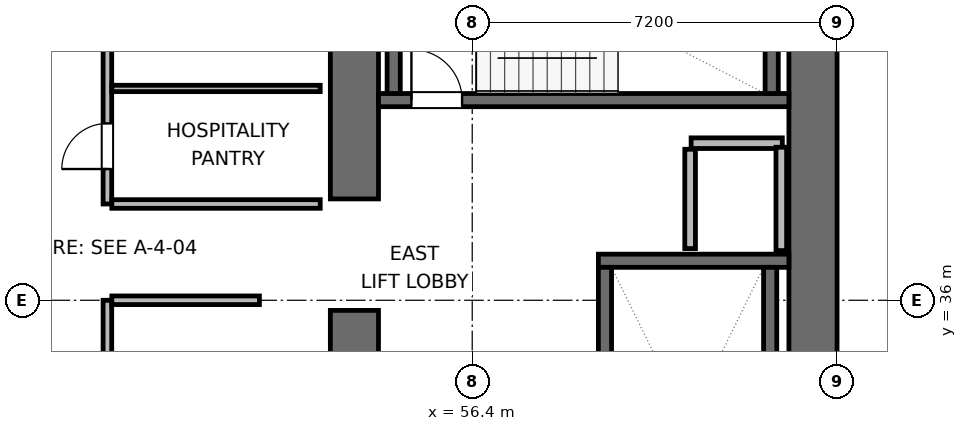
"""IFC4 building model, lengths in metres.
Left out: names, types, materials, properties, quantities, classifications, styles, units other than length and angle.
Written with IfcOpenShell. Run it as: python <this file> out.ifc"""

import sys

from ifc_helpers import new_model, si_unit, direction, frame, frame_2d, origin, place, context, subcontext, project, spatial, rectangle, extrude, element, fill, save


model = new_model("IFC4")
c1 = context("Model", 3, precision=1e-05, world=origin(), true_north=direction((0.0, 1.0)))
c2 = subcontext(c1, "Body", "Model", "MODEL_VIEW")
j1 = project(units=[si_unit("LENGTHUNIT", "METRE"), si_unit("PLANEANGLEUNIT", "RADIAN")], contexts=[c1])
p1 = place(None, origin())
s1 = spatial("IfcSite", under=j1, at=p1, CompositionType="ELEMENT")
p2 = place(p1, origin())
s2 = spatial("IfcBuilding", under=s1, at=p2, CompositionType="ELEMENT")
p3 = place(p2, frame((0.0, 0.0, 33.3)))
s3 = spatial("IfcBuildingStorey", under=s2, at=p3, CompositionType="ELEMENT", Elevation=33.3)
p4 = place(p3, frame((54.075, 28.075, 0.0), z_axis=(0.0, 0.0, 1.0), x_axis=(0.0, 1.0, 0.0)))
e1 = element("IfcWall", 1, at=p4, inside=s3, PredefinedType="SHEAR", context=c2, shape_type="SweptSolid", body=[
    extrude(rectangle(XDim=7.725, YDim=0.95, at=frame_2d((3.863, 0.0))), origin(), (0.0, 0.0, 1.0), 3.9),
])
p5 = place(p3, frame((54.075, 38.0, 0.0), z_axis=(0.0, 0.0, 1.0), x_axis=(0.0, 1.0, 0.0)))
e2 = element("IfcWall", 2, at=p5, inside=s3, PredefinedType="SHEAR", context=c2, shape_type="SweptSolid", body=[
    extrude(rectangle(XDim=5.925, YDim=0.95, at=frame_2d((2.962, 0.0))), origin(), (0.0, 0.0, 1.0), 3.9),
])
p6 = place(p3, frame((63.125, 27.6, 0.0), z_axis=(0.0, 0.0, 1.0), x_axis=(0.0, 1.0, 0.0)))
e3 = element("IfcWall", 3, at=p6, inside=s3, PredefinedType="SHEAR", context=c2, shape_type="SweptSolid", body=[
    extrude(rectangle(XDim=16.8, YDim=0.95, at=frame_2d((8.4, 0.0))), origin(), (0.0, 0.0, 1.0), 3.9),
])
p7 = place(p3, frame((58.89, 36.78, 0.0), z_axis=(0.0, 0.0, 1.0), x_axis=(1.0, 0.0, 0.0)))
e4 = element("IfcWall", 4, at=p7, inside=s3, PredefinedType="SHEAR", context=c2, shape_type="SweptSolid", body=[
    extrude(rectangle(XDim=3.76, YDim=0.26, at=frame_2d((1.88, 0.0))), origin(), (0.0, 0.0, 1.0), 3.9),
])
p8 = place(p3, frame((59.02, 29.05, 0.0), z_axis=(0.0, 0.0, 1.0), x_axis=(0.0, 1.0, 0.0)))
e5 = element("IfcWall", 5, at=p8, inside=s3, PredefinedType="SHEAR", context=c2, shape_type="SweptSolid", body=[
    extrude(rectangle(XDim=7.6, YDim=0.26, at=frame_2d((3.8, 0.0))), origin(), (0.0, 0.0, 1.0), 3.9),
])
p9 = place(p8, frame((0.3, 0.0, 0.0)))
e6 = element("IfcOpeningElement", 6, at=p9, cuts=e5, PredefinedType="OPENING", context=c2, shape_type="SweptSolid", body=[
    extrude(rectangle(XDim=1.0, YDim=2.04, at=frame_2d((0.5, 1.02))), frame((0.0, 0.14, 0.0), z_axis=(0.0, -1.0, 0.0), x_axis=(1.0, 0.0, 0.0)), (0.0, 0.0, 1.0), 0.28),
])
p10 = place(p3, frame((62.28, 29.05, 0.0), z_axis=(0.0, 0.0, 1.0), x_axis=(0.0, 1.0, 0.0)))
e7 = element("IfcWall", 7, at=p10, inside=s3, PredefinedType="SHEAR", context=c2, shape_type="SweptSolid", body=[
    extrude(rectangle(XDim=7.6, YDim=0.26, at=frame_2d((3.8, 0.0))), origin(), (0.0, 0.0, 1.0), 3.9),
])
p11 = place(p3, frame((54.55, 39.95, 0.0), z_axis=(0.0, 0.0, 1.0), x_axis=(1.0, 0.0, 0.0)))
e8 = element("IfcWall", 8, at=p11, inside=s3, PredefinedType="SHEAR", context=c2, shape_type="SweptSolid", body=[
    extrude(rectangle(XDim=8.1, YDim=0.26, at=frame_2d((4.05, 0.0))), origin(), (0.0, 0.0, 1.0), 3.9),
])
p12 = place(p11, frame((0.65, 0.0, 0.0)))
e9 = element("IfcOpeningElement", 9, at=p12, cuts=e8, PredefinedType="OPENING", context=c2, shape_type="SweptSolid", body=[
    extrude(rectangle(XDim=1.0, YDim=2.04, at=frame_2d((0.5, 1.02))), frame((0.0, 0.14, 0.0), z_axis=(0.0, -1.0, 0.0), x_axis=(1.0, 0.0, 0.0)), (0.0, 0.0, 1.0), 0.28),
])
for number, where, z_axis, x_axis in (
    (10, (54.85, 40.08, 0.0), (0.0, 0.0, 1.0), (0.0, 1.0, 0.0)),
    (11, (62.31, 40.08, 0.0), (0.0, 0.0, 1.0), (0.0, 1.0, 0.0)),
):
    element("IfcWall", number, at=place(p3, frame(where, z_axis=z_axis, x_axis=x_axis)), inside=s3, PredefinedType="SHEAR", context=c2, shape_type="SweptSolid", body=[
        extrude(rectangle(XDim=2.94, YDim=0.26, at=frame_2d((1.47, 0.0))), origin(), (0.0, 0.0, 1.0), 3.9),
    ])
p13 = place(p3, frame((60.72, 39.1, 0.0), z_axis=(0.0, 0.0, 1.0), x_axis=(1.0, 0.0, 0.0)))
e12 = element("IfcWall", 12, at=p13, inside=s3, PredefinedType="PARTITIONING", context=c2, shape_type="SweptSolid", body=[
    extrude(rectangle(XDim=1.8, YDim=0.21, at=frame_2d((0.9, 0.0))), origin(), (0.0, 0.0, 1.0), 3.64),
])
p14 = place(p3, frame((60.7, 37.02, 0.0), z_axis=(0.0, 0.0, 1.0), x_axis=(0.0, 1.0, 0.0)))
e13 = element("IfcWall", 13, at=p14, inside=s3, PredefinedType="PARTITIONING", context=c2, shape_type="SweptSolid", body=[
    extrude(rectangle(XDim=1.96, YDim=0.21, at=frame_2d((0.98, 0.0))), origin(), (0.0, 0.0, 1.0), 3.64),
])
p15 = place(p3, frame((62.5, 36.98, 0.0), z_axis=(0.0, 0.0, 1.0), x_axis=(0.0, 1.0, 0.0)))
e14 = element("IfcWall", 14, at=p15, inside=s3, PredefinedType="PARTITIONING", context=c2, shape_type="SweptSolid", body=[
    extrude(rectangle(XDim=2.04, YDim=0.21, at=frame_2d((1.02, 0.0))), origin(), (0.0, 0.0, 1.0), 3.64),
])
p16 = place(p3, frame((49.2, 32.6, 0.0), z_axis=(0.0, 0.0, 1.0), x_axis=(0.0, 1.0, 0.0)))
e15 = element("IfcWall", 15, at=p16, inside=s3, PredefinedType="PARTITIONING", context=c2, shape_type="SweptSolid", body=[
    extrude(rectangle(XDim=3.4, YDim=0.17, at=frame_2d((1.7, 0.0))), origin(), (0.0, 0.0, 1.0), 3.64),
])
p17 = place(p16, frame((0.638, 0.0, 0.0)))
e16 = element("IfcOpeningElement", 16, at=p17, cuts=e15, PredefinedType="OPENING", context=c2, shape_type="SweptSolid", body=[
    extrude(rectangle(XDim=0.9, YDim=2.02, at=frame_2d((0.45, 1.01))), frame((0.0, 0.095, 0.0), z_axis=(0.0, -1.0, 0.0), x_axis=(1.0, 0.0, 0.0)), (0.0, 0.0, 1.0), 0.19),
])
p18 = place(p3, frame((49.287, 36.0, 0.0), z_axis=(0.0, 0.0, 1.0), x_axis=(1.0, 0.0, 0.0)))
e17 = element("IfcWall", 17, at=p18, inside=s3, PredefinedType="PARTITIONING", context=c2, shape_type="SweptSolid", body=[
    extrude(rectangle(XDim=2.913, YDim=0.17, at=frame_2d((1.457, 0.0))), origin(), (0.0, 0.0, 1.0), 3.64),
])
p19 = place(p3, frame((49.2, 37.9, 0.0), z_axis=(0.0, 0.0, 1.0), x_axis=(0.0, 1.0, 0.0)))
e18 = element("IfcWall", 18, at=p19, inside=s3, PredefinedType="PARTITIONING", context=c2, shape_type="SweptSolid", body=[
    extrude(rectangle(XDim=6.0, YDim=0.17, at=frame_2d((3.0, 0.0))), origin(), (0.0, 0.0, 1.0), 3.64),
])
p20 = place(p19, frame((0.69, 0.0, 0.0)))
e19 = element("IfcOpeningElement", 19, at=p20, cuts=e18, PredefinedType="OPENING", context=c2, shape_type="SweptSolid", body=[
    extrude(rectangle(XDim=0.9, YDim=2.02, at=frame_2d((0.45, 1.01))), frame((0.0, 0.095, 0.0), z_axis=(0.0, -1.0, 0.0), x_axis=(1.0, 0.0, 0.0)), (0.0, 0.0, 1.0), 0.19),
])
p21 = place(p19, frame((3.69, 0.0, 0.0)))
e20 = element("IfcOpeningElement", 20, at=p21, cuts=e18, PredefinedType="OPENING", context=c2, shape_type="SweptSolid", body=[
    extrude(rectangle(XDim=0.9, YDim=2.02, at=frame_2d((0.45, 1.01))), frame((0.0, 0.095, 0.0), z_axis=(0.0, -1.0, 0.0), x_axis=(1.0, 0.0, 0.0)), (0.0, 0.0, 1.0), 0.19),
])
p22 = place(p3, frame((49.287, 37.9, 0.0), z_axis=(0.0, 0.0, 1.0), x_axis=(1.0, 0.0, 0.0)))
e21 = element("IfcWall", 21, at=p22, inside=s3, PredefinedType="PARTITIONING", context=c2, shape_type="SweptSolid", body=[
    extrude(rectangle(XDim=4.113, YDim=0.17, at=frame_2d((2.056, 0.0))), origin(), (0.0, 0.0, 1.0), 3.64),
])
p23 = place(p3, frame((49.287, 40.18, 0.0), z_axis=(0.0, 0.0, 1.0), x_axis=(1.0, 0.0, 0.0)))
e22 = element("IfcWall", 22, at=p23, inside=s3, PredefinedType="PARTITIONING", context=c2, shape_type="SweptSolid", body=[
    extrude(rectangle(XDim=4.113, YDim=0.125, at=frame_2d((2.056, 0.0))), origin(), (0.0, 0.0, 1.0), 3.64),
])
p24 = place(p12, origin())
e23 = element("IfcDoor", 23, at=p24, inside=s3, OperationType="SINGLE_SWING_LEFT", PredefinedType="DOOR", context=c2, shape_type="SweptSolid", body=[
    extrude(rectangle(XDim=1.0, YDim=2.04, at=frame_2d((0.5, 1.02))), frame((0.0, 0.025, 0.0), z_axis=(0.0, -1.0, 0.0), x_axis=(1.0, 0.0, 0.0)), (0.0, 0.0, 1.0), 0.05),
])
fill(e9, e23)
p25 = place(p20, origin())
e24 = element("IfcDoor", 24, at=p25, inside=s3, OperationType="SINGLE_SWING_LEFT", PredefinedType="DOOR", context=c2, shape_type="SweptSolid", body=[
    extrude(rectangle(XDim=0.9, YDim=2.02, at=frame_2d((0.45, 1.01))), frame((0.0, 0.025, 0.0), z_axis=(0.0, -1.0, 0.0), x_axis=(1.0, 0.0, 0.0)), (0.0, 0.0, 1.0), 0.05),
])
fill(e19, e24)
save(model, sys.argv[1])
